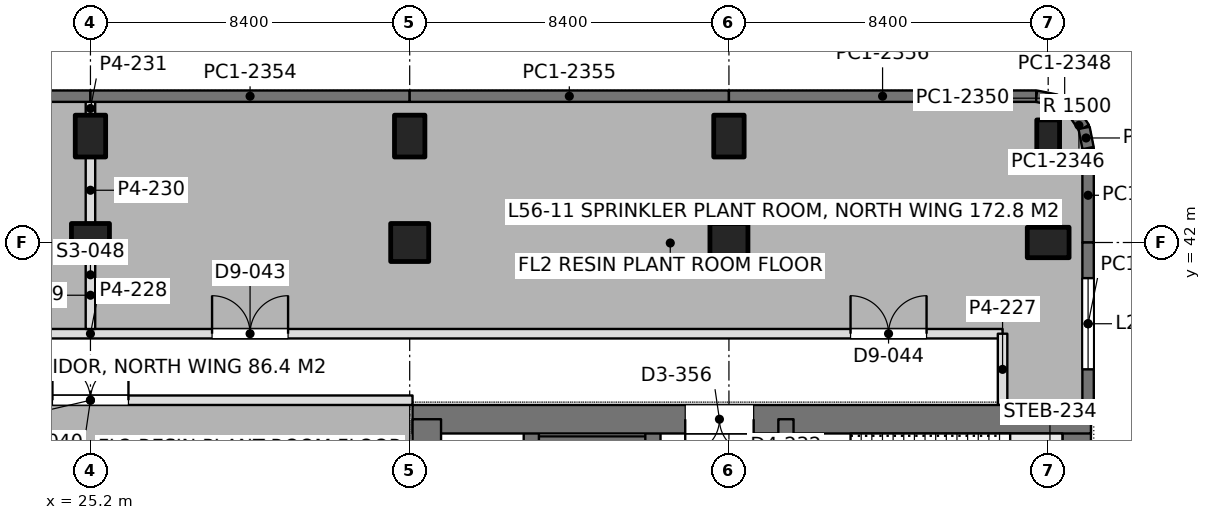
"""IFC4 building model, lengths in metres.
Left out: names, types, materials, properties, quantities, classifications, styles, units other than length and angle.
Written with IfcOpenShell. Run it as: python <this file> out.ifc"""

import sys

from ifc_helpers import new_model, si_unit, direction, frame, frame_2d, origin, origin_2d, place, context, subcontext, project, spatial, rectangle, extrude, element, fill, save


model = new_model("IFC4")
c1 = context("Model", 3, precision=1e-05, world=origin(), true_north=direction((0.0, 1.0)))
c2 = subcontext(c1, "Body", "Model", "MODEL_VIEW")
j1 = project(units=[si_unit("LENGTHUNIT", "METRE"), si_unit("PLANEANGLEUNIT", "RADIAN")], contexts=[c1])
p1 = place(None, origin())
s1 = spatial("IfcSite", under=j1, at=p1, CompositionType="ELEMENT")
p2 = place(p1, origin())
s2 = spatial("IfcBuilding", under=s1, at=p2, CompositionType="ELEMENT")
p3 = place(p2, frame((0.0, 0.0, 244.8)))
s3 = spatial("IfcBuildingStorey", under=s2, at=p3, CompositionType="ELEMENT", Elevation=244.8)
p4 = place(p3, frame((25.2, 42.0, 0.0), z_axis=(0.0, 0.0, 1.0), x_axis=(1.0, 0.0, 0.0)))
e1 = element("IfcColumn", 1, at=p4, inside=s3, PredefinedType="COLUMN", context=c2, shape_type="SweptSolid", body=[
    extrude(rectangle(XDim=1.0, YDim=1.0, at=origin_2d()), origin(), (0.0, 0.0, 1.0), 5.4),
])
p5 = place(p3, frame((25.2, 44.8, 0.0), z_axis=(0.0, 0.0, 1.0), x_axis=(1.0, 0.0, 0.0)))
e2 = element("IfcColumn", 2, at=p5, inside=s3, PredefinedType="COLUMN", context=c2, shape_type="SweptSolid", body=[
    extrude(rectangle(XDim=0.8, YDim=1.1, at=origin_2d()), origin(), (0.0, 0.0, 1.0), 5.4),
])
p6 = place(p3, frame((33.6, 42.0, 0.0), z_axis=(0.0, 0.0, 1.0), x_axis=(1.0, 0.0, 0.0)))
e3 = element("IfcColumn", 3, at=p6, inside=s3, PredefinedType="COLUMN", context=c2, shape_type="SweptSolid", body=[
    extrude(rectangle(XDim=1.0, YDim=1.0, at=origin_2d()), origin(), (0.0, 0.0, 1.0), 5.4),
])
p7 = place(p3, frame((33.6, 44.8, 0.0), z_axis=(0.0, 0.0, 1.0), x_axis=(1.0, 0.0, 0.0)))
e4 = element("IfcColumn", 4, at=p7, inside=s3, PredefinedType="COLUMN", context=c2, shape_type="SweptSolid", body=[
    extrude(rectangle(XDim=0.8, YDim=1.1, at=origin_2d()), origin(), (0.0, 0.0, 1.0), 5.4),
])
p8 = place(p3, frame((42.0, 42.0, 0.0), z_axis=(0.0, 0.0, 1.0), x_axis=(1.0, 0.0, 0.0)))
e5 = element("IfcColumn", 5, at=p8, inside=s3, PredefinedType="COLUMN", context=c2, shape_type="SweptSolid", body=[
    extrude(rectangle(XDim=1.0, YDim=1.0, at=origin_2d()), origin(), (0.0, 0.0, 1.0), 5.4),
])
for number, where, z_axis, x_axis in (
    (6, (42.0, 44.8, 0.0), (0.0, 0.0, 1.0), (1.0, 0.0, 0.0)),
    (7, (50.4, 42.0, 0.0), (0.0, 0.0, 1.0), (0.0, 1.0, 0.0)),
):
    element("IfcColumn", number, at=place(p3, frame(where, z_axis=z_axis, x_axis=x_axis)), inside=s3, PredefinedType="COLUMN", context=c2, shape_type="SweptSolid", body=[
        extrude(rectangle(XDim=0.8, YDim=1.1, at=origin_2d()), origin(), (0.0, 0.0, 1.0), 5.4),
    ])
p9 = place(p3, frame((50.4, 44.8, 0.0), z_axis=(0.0, 0.0, 1.0), x_axis=(1.0, 0.0, 0.0)))
e8 = element("IfcColumn", 8, at=p9, inside=s3, PredefinedType="COLUMN", context=c2, shape_type="SweptSolid", body=[
    extrude(rectangle(XDim=0.6, YDim=0.85, at=origin_2d()), origin(), (0.0, 0.0, 1.0), 5.4),
])
p10 = place(p3, frame((33.675, 37.35, 0.0), z_axis=(0.0, 0.0, 1.0), x_axis=(1.0, 0.0, 0.0)))
e9 = element("IfcWall", 9, at=p10, inside=s3, PredefinedType="SHEAR", context=c2, shape_type="SweptSolid", body=[
    extrude(rectangle(XDim=17.85, YDim=0.75, at=frame_2d((8.925, 0.0))), origin(), (0.0, 0.0, 1.0), 5.4),
])
p11 = place(p10, frame((7.175, 0.0, 0.0)))
e10 = element("IfcOpeningElement", 10, at=p11, cuts=e9, PredefinedType="OPENING", context=c2, shape_type="SweptSolid", body=[
    extrude(rectangle(XDim=1.8, YDim=2.4, at=frame_2d((0.9, 1.2))), frame((0.0, 0.385, 0.0), z_axis=(0.0, -1.0, 0.0), x_axis=(1.0, 0.0, 0.0)), (0.0, 0.0, 1.0), 0.77),
])
p12 = place(p3, frame((34.05, 27.8, 0.0), z_axis=(0.0, 0.0, 1.0), x_axis=(0.0, 1.0, 0.0)))
e11 = element("IfcWall", 11, at=p12, inside=s3, PredefinedType="SHEAR", context=c2, shape_type="SweptSolid", body=[
    extrude(rectangle(XDim=9.55, YDim=0.75, at=frame_2d((4.775, 0.0))), origin(), (0.0, 0.0, 1.0), 5.4),
])
p13 = place(p3, frame((51.15, 13.05, 0.0), z_axis=(0.0, 0.0, 1.0), x_axis=(0.0, 1.0, 0.0)))
e12 = element("IfcWall", 12, at=p13, inside=s3, PredefinedType="SHEAR", context=c2, shape_type="SweptSolid", body=[
    extrude(rectangle(XDim=24.3, YDim=0.75, at=frame_2d((12.15, 0.0))), origin(), (0.0, 0.0, 1.0), 5.4),
])
p14 = place(p3, frame((43.5, 13.05, 0.0), z_axis=(0.0, 0.0, 1.0), x_axis=(0.0, 1.0, 0.0)))
e13 = element("IfcWall", 13, at=p14, inside=s3, PredefinedType="SHEAR", context=c2, shape_type="SweptSolid", body=[
    extrude(rectangle(XDim=24.3, YDim=0.4, at=frame_2d((12.15, 0.0))), origin(), (0.0, 0.0, 1.0), 5.4),
])
p15 = place(p14, frame((1.3, 0.0, 0.0)))
e14 = element("IfcOpeningElement", 14, at=p15, cuts=e13, PredefinedType="OPENING", context=c2, shape_type="SweptSolid", body=[
    extrude(rectangle(XDim=1.0, YDim=2.2, at=frame_2d((0.5, 1.1))), frame((0.0, 0.21, 0.0), z_axis=(0.0, -1.0, 0.0), x_axis=(1.0, 0.0, 0.0)), (0.0, 0.0, 1.0), 0.42),
])
p16 = place(p14, frame((22.0, 0.0, 0.0)))
e15 = element("IfcOpeningElement", 15, at=p16, cuts=e13, PredefinedType="OPENING", context=c2, shape_type="SweptSolid", body=[
    extrude(rectangle(XDim=1.0, YDim=2.2, at=frame_2d((0.5, 1.1))), frame((0.0, 0.21, 0.0), z_axis=(0.0, -1.0, 0.0), x_axis=(1.0, 0.0, 0.0)), (0.0, 0.0, 1.0), 0.42),
])
p17 = place(p14, frame((5.55, 0.0, 0.0)))
e16 = element("IfcOpeningElement", 16, at=p17, cuts=e13, PredefinedType="OPENING", context=c2, shape_type="SweptSolid", body=[
    extrude(rectangle(XDim=1.0, YDim=2.2, at=frame_2d((0.5, 1.1))), frame((0.0, 0.21, 0.0), z_axis=(0.0, -1.0, 0.0), x_axis=(1.0, 0.0, 0.0)), (0.0, 0.0, 1.0), 0.42),
])
p18 = place(p14, frame((9.55, 0.0, 0.0)))
e17 = element("IfcOpeningElement", 17, at=p18, cuts=e13, PredefinedType="OPENING", context=c2, shape_type="SweptSolid", body=[
    extrude(rectangle(XDim=1.0, YDim=2.2, at=frame_2d((0.5, 1.1))), frame((0.0, 0.21, 0.0), z_axis=(0.0, -1.0, 0.0), x_axis=(1.0, 0.0, 0.0)), (0.0, 0.0, 1.0), 0.42),
])
p19 = place(p14, frame((12.8, 0.0, 0.0)))
e18 = element("IfcOpeningElement", 18, at=p19, cuts=e13, PredefinedType="OPENING", context=c2, shape_type="SweptSolid", body=[
    extrude(rectangle(XDim=1.1, YDim=2.2, at=frame_2d((0.55, 1.1))), frame((0.0, 0.21, 0.0), z_axis=(0.0, -1.0, 0.0), x_axis=(1.0, 0.0, 0.0)), (0.0, 0.0, 1.0), 0.42),
])
p20 = place(p14, frame((15.538, 0.0, 0.0)))
e19 = element("IfcOpeningElement", 19, at=p20, cuts=e13, PredefinedType="OPENING", context=c2, shape_type="SweptSolid", body=[
    extrude(rectangle(XDim=1.1, YDim=2.2, at=frame_2d((0.55, 1.1))), frame((0.0, 0.21, 0.0), z_axis=(0.0, -1.0, 0.0), x_axis=(1.0, 0.0, 0.0)), (0.0, 0.0, 1.0), 0.42),
])
p21 = place(p14, frame((18.262, 0.0, 0.0)))
e20 = element("IfcOpeningElement", 20, at=p21, cuts=e13, PredefinedType="OPENING", context=c2, shape_type="SweptSolid", body=[
    extrude(rectangle(XDim=1.1, YDim=2.2, at=frame_2d((0.55, 1.1))), frame((0.0, 0.21, 0.0), z_axis=(0.0, -1.0, 0.0), x_axis=(1.0, 0.0, 0.0)), (0.0, 0.0, 1.0), 0.42),
])
p22 = place(p3, frame((40.0, 13.05, 0.0), z_axis=(0.0, 0.0, 1.0), x_axis=(0.0, 1.0, 0.0)))
e21 = element("IfcWall", 21, at=p22, inside=s3, PredefinedType="SHEAR", context=c2, shape_type="SweptSolid", body=[
    extrude(rectangle(XDim=24.3, YDim=0.4, at=frame_2d((12.15, 0.0))), origin(), (0.0, 0.0, 1.0), 5.4),
])
p23 = place(p22, frame((15.75, 0.0, 0.0)))
e22 = element("IfcOpeningElement", 22, at=p23, cuts=e21, PredefinedType="OPENING", context=c2, shape_type="SweptSolid", body=[
    extrude(rectangle(XDim=1.1, YDim=2.2, at=frame_2d((0.55, 1.1))), frame((0.0, 0.21, 0.0), z_axis=(0.0, -1.0, 0.0), x_axis=(1.0, 0.0, 0.0)), (0.0, 0.0, 1.0), 0.42),
])
p24 = place(p22, frame((18.6, 0.0, 0.0)))
e23 = element("IfcOpeningElement", 23, at=p24, cuts=e21, PredefinedType="OPENING", context=c2, shape_type="SweptSolid", body=[
    extrude(rectangle(XDim=1.1, YDim=2.2, at=frame_2d((0.55, 1.1))), frame((0.0, 0.21, 0.0), z_axis=(0.0, -1.0, 0.0), x_axis=(1.0, 0.0, 0.0)), (0.0, 0.0, 1.0), 0.42),
])
p25 = place(p22, frame((21.45, 0.0, 0.0)))
e24 = element("IfcOpeningElement", 24, at=p25, cuts=e21, PredefinedType="OPENING", context=c2, shape_type="SweptSolid", body=[
    extrude(rectangle(XDim=1.1, YDim=2.2, at=frame_2d((0.55, 1.1))), frame((0.0, 0.21, 0.0), z_axis=(0.0, -1.0, 0.0), x_axis=(1.0, 0.0, 0.0)), (0.0, 0.0, 1.0), 0.42),
])
p26 = place(p22, frame((8.65, 0.0, 0.0)))
e25 = element("IfcOpeningElement", 25, at=p26, cuts=e21, PredefinedType="OPENING", context=c2, shape_type="SweptSolid", body=[
    extrude(rectangle(XDim=1.8, YDim=2.4, at=frame_2d((0.9, 1.2))), frame((0.0, 0.21, 0.0), z_axis=(0.0, -1.0, 0.0), x_axis=(1.0, 0.0, 0.0)), (0.0, 0.0, 1.0), 0.42),
])
p27 = place(p22, frame((1.05, 0.0, 0.0)))
e26 = element("IfcOpeningElement", 26, at=p27, cuts=e21, PredefinedType="OPENING", context=c2, shape_type="SweptSolid", body=[
    extrude(rectangle(XDim=1.8, YDim=2.4, at=frame_2d((0.9, 1.2))), frame((0.0, 0.21, 0.0), z_axis=(0.0, -1.0, 0.0), x_axis=(1.0, 0.0, 0.0)), (0.0, 0.0, 1.0), 0.42),
])
p28 = place(p3, frame((36.8, 27.925, 0.0), z_axis=(0.0, 0.0, 1.0), x_axis=(0.0, 1.0, 0.0)))
e27 = element("IfcWall", 27, at=p28, inside=s3, PredefinedType="SHEAR", context=c2, shape_type="SweptSolid", body=[
    extrude(rectangle(XDim=9.425, YDim=0.4, at=frame_2d((4.712, 0.0))), origin(), (0.0, 0.0, 1.0), 5.4),
])
p29 = place(p3, frame((40.0, 36.625, 0.0), z_axis=(0.0, 0.0, 1.0), x_axis=(-1.0, 0.0, 0.0)))
e28 = element("IfcWall", 28, at=p29, inside=s3, PredefinedType="SHEAR", context=c2, shape_type="SweptSolid", body=[
    extrude(rectangle(XDim=3.2, YDim=0.55, at=frame_2d((1.6, 0.0))), origin(), (0.0, 0.0, 1.0), 5.4),
])
p30 = place(p3, frame((16.8, 45.85, 0.0), z_axis=(0.0, 0.0, 1.0), x_axis=(1.0, 0.0, 0.0)))
e29 = element("IfcWall", 29, at=p30, inside=s3, PredefinedType="SOLIDWALL", context=c2, shape_type="SweptSolid", body=[
    extrude(rectangle(XDim=8.4, YDim=0.3, at=frame_2d((4.2, 0.0))), origin(), (0.0, 0.0, 1.0), 5.25),
])
p31 = place(p3, frame((25.2, 45.85, 0.0), z_axis=(0.0, 0.0, 1.0), x_axis=(1.0, 0.0, 0.0)))
e30 = element("IfcWall", 30, at=p31, inside=s3, PredefinedType="SOLIDWALL", context=c2, shape_type="SweptSolid", body=[
    extrude(rectangle(XDim=8.4, YDim=0.3, at=frame_2d((4.2, 0.0))), origin(), (0.0, 0.0, 1.0), 5.25),
])
p32 = place(p3, frame((33.6, 45.85, 0.0), z_axis=(0.0, 0.0, 1.0), x_axis=(1.0, 0.0, 0.0)))
e31 = element("IfcWall", 31, at=p32, inside=s3, PredefinedType="SOLIDWALL", context=c2, shape_type="SweptSolid", body=[
    extrude(rectangle(XDim=8.4, YDim=0.3, at=frame_2d((4.2, 0.0))), origin(), (0.0, 0.0, 1.0), 5.25),
])
p33 = place(p3, frame((42.0, 45.85, 0.0), z_axis=(0.0, 0.0, 1.0), x_axis=(1.0, 0.0, 0.0)))
e32 = element("IfcWall", 32, at=p33, inside=s3, PredefinedType="SOLIDWALL", context=c2, shape_type="SweptSolid", body=[
    extrude(rectangle(XDim=8.085, YDim=0.3, at=frame_2d((4.042, 0.0))), origin(), (0.0, 0.0, 1.0), 5.25),
])
p34 = place(p3, frame((50.085, 45.85, 0.0), z_axis=(0.0, 0.0, 1.0), x_axis=(0.980702050465, -0.1955082817, 0.0)))
e33 = element("IfcWall", 33, at=p34, inside=s3, PredefinedType="SOLIDWALL", context=c2, shape_type="SweptSolid", body=[
    extrude(rectangle(XDim=0.541, YDim=0.3, at=frame_2d((0.271, 0.0))), origin(), (0.0, 0.0, 1.0), 5.25),
])
p35 = place(p3, frame((50.615, 45.744, 0.0), z_axis=(0.0, 0.0, 1.0), x_axis=(0.831692711774, -0.555236195849, 0.0)))
e34 = element("IfcWall", 34, at=p35, inside=s3, PredefinedType="SOLIDWALL", context=c2, shape_type="SweptSolid", body=[
    extrude(rectangle(XDim=0.525, YDim=0.3, at=frame_2d((0.263, 0.0))), origin(), (0.0, 0.0, 1.0), 5.25),
])
p36 = place(p3, frame((51.052, 45.453, 0.0), z_axis=(0.0, 0.0, 1.0), x_axis=(0.55534295404, -0.831621430339, 0.0)))
e35 = element("IfcWall", 35, at=p36, inside=s3, PredefinedType="SOLIDWALL", context=c2, shape_type="SweptSolid", body=[
    extrude(rectangle(XDim=0.526, YDim=0.3, at=frame_2d((0.263, 0.0))), origin(), (0.0, 0.0, 1.0), 5.25),
])
p37 = place(p3, frame((51.344, 45.015, 0.0), z_axis=(0.0, 0.0, 1.0), x_axis=(0.195073962632, -0.980788534345, 0.0)))
e36 = element("IfcWall", 36, at=p37, inside=s3, PredefinedType="SOLIDWALL", context=c2, shape_type="SweptSolid", body=[
    extrude(rectangle(XDim=0.541, YDim=0.3, at=frame_2d((0.271, 0.0))), origin(), (0.0, 0.0, 1.0), 5.25),
])
p38 = place(p3, frame((51.45, 44.485, 0.0), z_axis=(0.0, 0.0, 1.0), x_axis=(0.0, -1.0, 0.0)))
e37 = element("IfcWall", 37, at=p38, inside=s3, PredefinedType="SOLIDWALL", context=c2, shape_type="SweptSolid", body=[
    extrude(rectangle(XDim=2.485, YDim=0.3, at=frame_2d((1.243, 0.0))), origin(), (0.0, 0.0, 1.0), 5.25),
])
p39 = place(p3, frame((51.45, 42.0, 0.0), z_axis=(0.0, 0.0, 1.0), x_axis=(0.0, -1.0, 0.0)))
e38 = element("IfcWall", 38, at=p39, inside=s3, PredefinedType="SOLIDWALL", context=c2, shape_type="SweptSolid", body=[
    extrude(rectangle(XDim=4.275, YDim=0.3, at=frame_2d((2.137, 0.0))), origin(), (0.0, 0.0, 1.0), 5.25),
])
p40 = place(p39, frame((0.938, 0.0, 1.2)))
e39 = element("IfcOpeningElement", 39, at=p40, cuts=e38, PredefinedType="OPENING", context=c2, shape_type="SweptSolid", body=[
    extrude(rectangle(XDim=2.4, YDim=2.4, at=frame_2d((1.2, 1.2))), frame((0.0, 0.16, 0.0), z_axis=(0.0, -1.0, 0.0), x_axis=(1.0, 0.0, 0.0)), (0.0, 0.0, 1.0), 0.32),
])
p41 = place(p3, frame((1.2, 39.6, 0.0), z_axis=(0.0, 0.0, 1.0), x_axis=(1.0, 0.0, 0.0)))
e40 = element("IfcWall", 40, at=p41, inside=s3, PredefinedType="PARTITIONING", context=c2, shape_type="SweptSolid", body=[
    extrude(rectangle(XDim=48.0, YDim=0.25, at=frame_2d((24.0, 0.0))), origin(), (0.0, 0.0, 1.0), 4.7),
])
p42 = place(p41, frame((2.0, 0.0, 0.0)))
e41 = element("IfcOpeningElement", 41, at=p42, cuts=e40, PredefinedType="OPENING", context=c2, shape_type="SweptSolid", body=[
    extrude(rectangle(XDim=2.0, YDim=2.4, at=frame_2d((1.0, 1.2))), frame((0.0, 0.135, 0.0), z_axis=(0.0, -1.0, 0.0), x_axis=(1.0, 0.0, 0.0)), (0.0, 0.0, 1.0), 0.27),
])
p43 = place(p41, frame((18.8, 0.0, 0.0)))
e42 = element("IfcOpeningElement", 42, at=p43, cuts=e40, PredefinedType="OPENING", context=c2, shape_type="SweptSolid", body=[
    extrude(rectangle(XDim=2.0, YDim=2.4, at=frame_2d((1.0, 1.2))), frame((0.0, 0.135, 0.0), z_axis=(0.0, -1.0, 0.0), x_axis=(1.0, 0.0, 0.0)), (0.0, 0.0, 1.0), 0.27),
])
p44 = place(p41, frame((27.2, 0.0, 0.0)))
e43 = element("IfcOpeningElement", 43, at=p44, cuts=e40, PredefinedType="OPENING", context=c2, shape_type="SweptSolid", body=[
    extrude(rectangle(XDim=2.0, YDim=2.4, at=frame_2d((1.0, 1.2))), frame((0.0, 0.135, 0.0), z_axis=(0.0, -1.0, 0.0), x_axis=(1.0, 0.0, 0.0)), (0.0, 0.0, 1.0), 0.27),
])
p45 = place(p41, frame((44.0, 0.0, 0.0)))
e44 = element("IfcOpeningElement", 44, at=p45, cuts=e40, PredefinedType="OPENING", context=c2, shape_type="SweptSolid", body=[
    extrude(rectangle(XDim=2.0, YDim=2.4, at=frame_2d((1.0, 1.2))), frame((0.0, 0.135, 0.0), z_axis=(0.0, -1.0, 0.0), x_axis=(1.0, 0.0, 0.0)), (0.0, 0.0, 1.0), 0.27),
])
p46 = place(p3, frame((49.2, 37.724, 0.0), z_axis=(0.0, 0.0, 1.0), x_axis=(0.0, 1.0, 0.0)))
e45 = element("IfcWall", 45, at=p46, inside=s3, PredefinedType="PARTITIONING", context=c2, shape_type="SweptSolid", body=[
    extrude(rectangle(XDim=1.876, YDim=0.25, at=frame_2d((0.938, 0.0))), origin(), (0.0, 0.0, 1.0), 5.25),
])
p47 = place(p3, frame((25.2, 39.724, 0.0), z_axis=(0.0, 0.0, 1.0), x_axis=(0.0, 1.0, 0.0)))
e46 = element("IfcWall", 46, at=p47, inside=s3, PredefinedType="PARTITIONING", context=c2, shape_type="SweptSolid", body=[
    extrude(rectangle(XDim=1.777, YDim=0.25, at=frame_2d((0.888, 0.0))), origin(), (0.0, 0.0, 1.0), 4.7),
])
p48 = place(p3, frame((25.2, 42.499, 0.0), z_axis=(0.0, 0.0, 1.0), x_axis=(0.0, 1.0, 0.0)))
e47 = element("IfcWall", 47, at=p48, inside=s3, PredefinedType="PARTITIONING", context=c2, shape_type="SweptSolid", body=[
    extrude(rectangle(XDim=1.752, YDim=0.25, at=frame_2d((0.876, 0.0))), origin(), (0.0, 0.0, 1.0), 4.89),
])
p49 = place(p3, frame((25.2, 45.351, 0.0), z_axis=(0.0, 0.0, 1.0), x_axis=(0.0, 1.0, 0.0)))
e48 = element("IfcWall", 48, at=p49, inside=s3, PredefinedType="PARTITIONING", context=c2, shape_type="SweptSolid", body=[
    extrude(rectangle(XDim=0.351, YDim=0.25, at=frame_2d((0.175, 0.0))), origin(), (0.0, 0.0, 1.0), 5.25),
])
p50 = place(p3, frame((16.725, 37.85, 0.0), z_axis=(0.0, 0.0, 1.0), x_axis=(1.0, 0.0, 0.0)))
e49 = element("IfcWall", 49, at=p50, inside=s3, PredefinedType="PARTITIONING", context=c2, shape_type="SweptSolid", body=[
    extrude(rectangle(XDim=16.95, YDim=0.25, at=frame_2d((8.475, 0.0))), origin(), (0.0, 0.0, 1.0), 4.7),
])
p51 = place(p50, frame((7.475, 0.0, 0.0)))
e50 = element("IfcOpeningElement", 50, at=p51, cuts=e49, PredefinedType="OPENING", context=c2, shape_type="SweptSolid", body=[
    extrude(rectangle(XDim=2.0, YDim=2.4, at=frame_2d((1.0, 1.2))), frame((0.0, 0.135, 0.0), z_axis=(0.0, -1.0, 0.0), x_axis=(1.0, 0.0, 0.0)), (0.0, 0.0, 1.0), 0.27),
])
p52 = place(p40, origin())
e51 = element("IfcWindow", 51, at=p52, inside=s3, PartitioningType="SINGLE_PANEL", PredefinedType="USERDEFINED", context=c2, shape_type="SweptSolid", body=[
    extrude(rectangle(XDim=2.4, YDim=2.4, at=frame_2d((1.2, 1.2))), frame((0.0, 0.03, 0.0), z_axis=(0.0, -1.0, 0.0), x_axis=(1.0, 0.0, 0.0)), (0.0, 0.0, 1.0), 0.06),
])
fill(e39, e51)
p53 = place(p11, frame((1.8, 0.0, 0.0), z_axis=(0.0, 0.0, 1.0), x_axis=(-1.0, 0.0, 0.0)))
e52 = element("IfcDoor", 52, at=p53, inside=s3, OperationType="DOUBLE_DOOR_SINGLE_SWING", PredefinedType="DOOR", context=c2, shape_type="SweptSolid", body=[
    extrude(rectangle(XDim=1.8, YDim=2.4, at=frame_2d((0.9, 1.2))), frame((0.0, 0.025, 0.0), z_axis=(0.0, -1.0, 0.0), x_axis=(1.0, 0.0, 0.0)), (0.0, 0.0, 1.0), 0.05),
])
fill(e10, e52)
p54 = place(p44, origin())
e53 = element("IfcDoor", 53, at=p54, inside=s3, OperationType="DOUBLE_DOOR_SINGLE_SWING", PredefinedType="DOOR", context=c2, shape_type="SweptSolid", body=[
    extrude(rectangle(XDim=2.0, YDim=2.4, at=frame_2d((1.0, 1.2))), frame((0.0, 0.025, 0.0), z_axis=(0.0, -1.0, 0.0), x_axis=(1.0, 0.0, 0.0)), (0.0, 0.0, 1.0), 0.05),
])
fill(e43, e53)
p55 = place(p45, origin())
e54 = element("IfcDoor", 54, at=p55, inside=s3, OperationType="DOUBLE_DOOR_SINGLE_SWING", PredefinedType="DOOR", context=c2, shape_type="SweptSolid", body=[
    extrude(rectangle(XDim=2.0, YDim=2.4, at=frame_2d((1.0, 1.2))), frame((0.0, 0.025, 0.0), z_axis=(0.0, -1.0, 0.0), x_axis=(1.0, 0.0, 0.0)), (0.0, 0.0, 1.0), 0.05),
])
fill(e44, e54)
p56 = place(p51, origin())
e55 = element("IfcDoor", 55, at=p56, inside=s3, OperationType="DOUBLE_DOOR_SINGLE_SWING", PredefinedType="DOOR", context=c2, shape_type="SweptSolid", body=[
    extrude(rectangle(XDim=2.0, YDim=2.4, at=frame_2d((1.0, 1.2))), frame((0.0, 0.025, 0.0), z_axis=(0.0, -1.0, 0.0), x_axis=(1.0, 0.0, 0.0)), (0.0, 0.0, 1.0), 0.05),
])
fill(e50, e55)
save(model, sys.argv[1])
